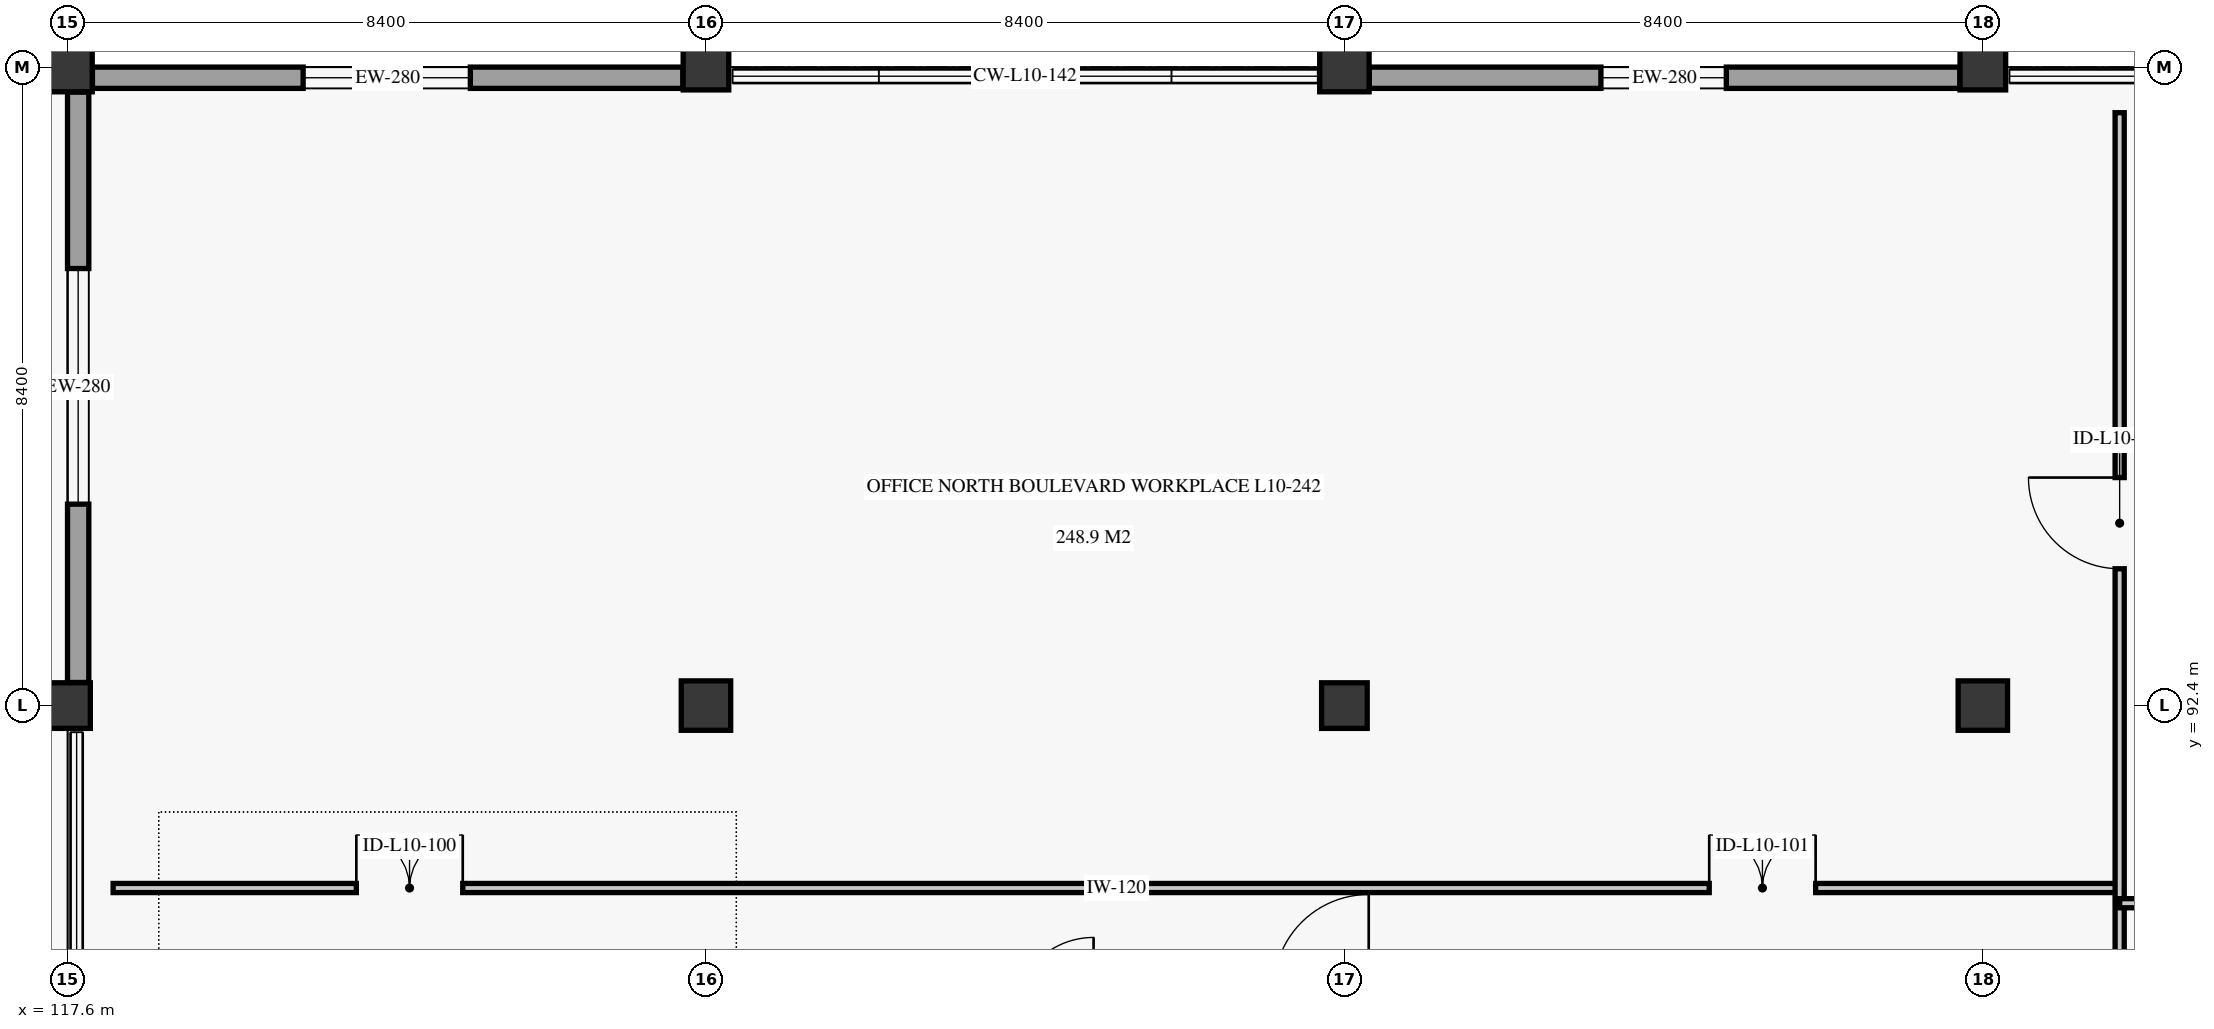
"""IFC4 building model, lengths in metres.
Left out: names, types, materials, properties, quantities, classifications, styles, units other than length and angle.
Written with IfcOpenShell. Run it as: python <this file> out.ifc"""

import sys

from ifc_helpers import new_model, si_unit, direction, frame, frame_2d, origin, origin_2d, place, context, subcontext, project, spatial, rectangle, extrude, element, fill, save


model = new_model("IFC4")
c1 = context("Model", 3, precision=1e-05, world=origin(), true_north=direction((0.0, 1.0)))
c2 = subcontext(c1, "Body", "Model", "MODEL_VIEW")
j1 = project(units=[si_unit("LENGTHUNIT", "METRE"), si_unit("PLANEANGLEUNIT", "RADIAN")], contexts=[c1])
p1 = place(None, origin())
s1 = spatial("IfcSite", under=j1, at=p1, CompositionType="ELEMENT")
p2 = place(p1, origin())
s2 = spatial("IfcBuilding", under=s1, at=p2, CompositionType="ELEMENT")
p3 = place(p2, frame((0.0, 0.0, 42.7)))
s3 = spatial("IfcBuildingStorey", under=s2, at=p3, CompositionType="ELEMENT", Elevation=42.7)
p4 = place(p3, frame((117.6, 92.4, 0.0), z_axis=(0.0, 0.0, 1.0), x_axis=(1.0, 0.0, 0.0)))
e1 = element("IfcColumn", 1, at=p4, inside=s3, PredefinedType="COLUMN", context=c2, shape_type="SweptSolid", body=[
    extrude(rectangle(XDim=0.6, YDim=0.6, at=origin_2d()), origin(), (0.0, 0.0, 1.0), 3.72),
])
for number, where, z_axis, x_axis in (
    (2, (117.6, 100.8, 0.0), (0.0, 0.0, 1.0), (1.0, 0.0, 0.0)),
    (3, (126.0, 92.4, 0.0), (0.0, 0.0, 1.0), (1.0, 0.0, 0.0)),
):
    element("IfcColumn", number, at=place(p3, frame(where, z_axis=z_axis, x_axis=x_axis)), inside=s3, PredefinedType="COLUMN", context=c2, shape_type="SweptSolid", body=[
        extrude(rectangle(XDim=0.65, YDim=0.65, at=origin_2d()), origin(), (0.0, 0.0, 1.0), 3.72),
    ])
for number, where, z_axis, x_axis in (
    (4, (126.0, 100.8, 0.0), (0.0, 0.0, 1.0), (1.0, 0.0, 0.0)),
    (5, (134.4, 92.4, 0.0), (0.0, 0.0, 1.0), (1.0, 0.0, 0.0)),
):
    element("IfcColumn", number, at=place(p3, frame(where, z_axis=z_axis, x_axis=x_axis)), inside=s3, PredefinedType="COLUMN", context=c2, shape_type="SweptSolid", body=[
        extrude(rectangle(XDim=0.6, YDim=0.6, at=origin_2d()), origin(), (0.0, 0.0, 1.0), 3.72),
    ])
for number, where, z_axis, x_axis in (
    (6, (134.4, 100.8, 0.0), (0.0, 0.0, 1.0), (1.0, 0.0, 0.0)),
    (7, (142.8, 92.4, 0.0), (0.0, 0.0, 1.0), (1.0, 0.0, 0.0)),
):
    element("IfcColumn", number, at=place(p3, frame(where, z_axis=z_axis, x_axis=x_axis)), inside=s3, PredefinedType="COLUMN", context=c2, shape_type="SweptSolid", body=[
        extrude(rectangle(XDim=0.65, YDim=0.65, at=origin_2d()), origin(), (0.0, 0.0, 1.0), 3.72),
    ])
p5 = place(p3, frame((142.8, 100.8, 0.0), z_axis=(0.0, 0.0, 1.0), x_axis=(1.0, 0.0, 0.0)))
e8 = element("IfcColumn", 8, at=p5, inside=s3, PredefinedType="COLUMN", context=c2, shape_type="SweptSolid", body=[
    extrude(rectangle(XDim=0.6, YDim=0.6, at=origin_2d()), origin(), (0.0, 0.0, 1.0), 3.72),
])
p6 = place(p3, frame((117.928, 100.66, 0.0), z_axis=(0.0, 0.0, 1.0), x_axis=(1.0, 0.0, 0.0)))
e9 = element("IfcWall", 9, at=p6, inside=s3, PredefinedType="SOLIDWALL", context=c2, shape_type="SweptSolid", body=[
    extrude(rectangle(XDim=7.768, YDim=0.28, at=frame_2d((3.884, 0.0))), origin(), (0.0, 0.0, 1.0), 3.04),
])
p7 = place(p6, frame((2.772, 0.0, 0.85)))
e10 = element("IfcOpeningElement", 10, at=p7, cuts=e9, PredefinedType="OPENING", context=c2, shape_type="SweptSolid", body=[
    extrude(rectangle(XDim=2.2, YDim=1.8, at=frame_2d((1.1, 0.9))), frame((0.0, 0.15, 0.0), z_axis=(0.0, -1.0, 0.0), x_axis=(1.0, 0.0, 0.0)), (0.0, 0.0, 1.0), 0.3),
])
p8 = place(p3, frame((134.728, 100.66, 0.0), z_axis=(0.0, 0.0, 1.0), x_axis=(1.0, 0.0, 0.0)))
e11 = element("IfcWall", 11, at=p8, inside=s3, PredefinedType="SOLIDWALL", context=c2, shape_type="SweptSolid", body=[
    extrude(rectangle(XDim=7.77, YDim=0.28, at=frame_2d((3.885, 0.0))), origin(), (0.0, 0.0, 1.0), 3.04),
])
p9 = place(p8, frame((3.047, 0.0, 0.85)))
e12 = element("IfcOpeningElement", 12, at=p9, cuts=e11, PredefinedType="OPENING", context=c2, shape_type="SweptSolid", body=[
    extrude(rectangle(XDim=1.65, YDim=1.75, at=frame_2d((0.825, 0.875))), frame((0.0, 0.15, 0.0), z_axis=(0.0, -1.0, 0.0), x_axis=(1.0, 0.0, 0.0)), (0.0, 0.0, 1.0), 0.3),
])
p10 = place(p3, frame((117.74, 92.704, 0.0), z_axis=(0.0, 0.0, 1.0), x_axis=(0.0, 1.0, 0.0)))
e13 = element("IfcWall", 13, at=p10, inside=s3, PredefinedType="SOLIDWALL", context=c2, shape_type="SweptSolid", body=[
    extrude(rectangle(XDim=7.768, YDim=0.28, at=frame_2d((3.884, 0.0))), origin(), (0.0, 0.0, 1.0), 3.04),
])
p11 = place(p10, frame((2.346, 0.0, 0.85)))
e14 = element("IfcOpeningElement", 14, at=p11, cuts=e13, PredefinedType="OPENING", context=c2, shape_type="SweptSolid", body=[
    extrude(rectangle(XDim=3.1, YDim=1.85, at=frame_2d((1.55, 0.925))), frame((0.0, 0.15, 0.0), z_axis=(0.0, -1.0, 0.0), x_axis=(1.0, 0.0, 0.0)), (0.0, 0.0, 1.0), 0.3),
])
p12 = place(p3, frame((109.32, 100.68, 0.0), z_axis=(0.0, 0.0, 1.0), x_axis=(1.0, 0.0, 0.0)))
e15 = element("IfcWall", 15, at=p12, inside=s3, PredefinedType="PARAPET", context=c2, shape_type="SweptSolid", body=[
    extrude(rectangle(XDim=8.16, YDim=0.19, at=frame_2d((4.08, 0.0))), origin(), (0.0, 0.0, 1.0), 1.25),
])
p13 = place(p3, frame((118.2, 90.0, 0.0), z_axis=(0.0, 0.0, 1.0), x_axis=(1.0, 0.0, 0.0)))
e16 = element("IfcWall", 16, at=p13, inside=s3, PredefinedType="PARTITIONING", context=c2, shape_type="SweptSolid", body=[
    extrude(rectangle(XDim=26.4, YDim=0.12, at=frame_2d((13.2, 0.0))), origin(), (0.0, 0.0, 1.0), 3.34),
])
p14 = place(p13, frame((3.2, 0.0, 0.0)))
e17 = element("IfcOpeningElement", 17, at=p14, cuts=e16, PredefinedType="OPENING", context=c2, shape_type="SweptSolid", body=[
    extrude(rectangle(XDim=1.4, YDim=2.35, at=frame_2d((0.7, 1.175))), frame((0.0, 0.07, 0.0), z_axis=(0.0, -1.0, 0.0), x_axis=(1.0, 0.0, 0.0)), (0.0, 0.0, 1.0), 0.14),
])
p15 = place(p13, frame((21.0, 0.0, 0.0)))
e18 = element("IfcOpeningElement", 18, at=p15, cuts=e16, PredefinedType="OPENING", context=c2, shape_type="SweptSolid", body=[
    extrude(rectangle(XDim=1.4, YDim=2.35, at=frame_2d((0.7, 1.175))), frame((0.0, 0.07, 0.0), z_axis=(0.0, -1.0, 0.0), x_axis=(1.0, 0.0, 0.0)), (0.0, 0.0, 1.0), 0.14),
])
p16 = place(p3, frame((144.6, 67.8, 0.0), z_axis=(0.0, 0.0, 1.0), x_axis=(0.0, 1.0, 0.0)))
e19 = element("IfcWall", 19, at=p16, inside=s3, PredefinedType="PARTITIONING", context=c2, shape_type="SweptSolid", body=[
    extrude(rectangle(XDim=32.4, YDim=0.12, at=frame_2d((16.2, 0.0))), origin(), (0.0, 0.0, 1.0), 3.34),
])
p17 = place(p16, frame((4.2, 0.0, 0.0)))
e20 = element("IfcOpeningElement", 20, at=p17, cuts=e19, PredefinedType="OPENING", context=c2, shape_type="SweptSolid", body=[
    extrude(rectangle(XDim=1.1, YDim=2.15, at=frame_2d((0.55, 1.075))), frame((0.0, 0.07, 0.0), z_axis=(0.0, -1.0, 0.0), x_axis=(1.0, 0.0, 0.0)), (0.0, 0.0, 1.0), 0.14),
])
p18 = place(p16, frame((26.4, 0.0, 0.0)))
e21 = element("IfcOpeningElement", 21, at=p18, cuts=e19, PredefinedType="OPENING", context=c2, shape_type="SweptSolid", body=[
    extrude(rectangle(XDim=1.2, YDim=2.3, at=frame_2d((0.6, 1.15))), frame((0.0, 0.07, 0.0), z_axis=(0.0, -1.0, 0.0), x_axis=(1.0, 0.0, 0.0)), (0.0, 0.0, 1.0), 0.14),
])
p19 = place(p3, frame((144.6, 89.8, 0.0), z_axis=(0.0, 0.0, 1.0), x_axis=(1.0, 0.0, 0.0)))
e22 = element("IfcWall", 22, at=p19, inside=s3, PredefinedType="PARTITIONING", context=c2, shape_type="SweptSolid", body=[
    extrude(rectangle(XDim=14.4, YDim=0.12, at=frame_2d((7.2, 0.0))), origin(), (0.0, 0.0, 1.0), 3.34),
])
p20 = place(p7, origin())
e23 = element("IfcWindow", 23, at=p20, inside=s3, PartitioningType="SINGLE_PANEL", PredefinedType="WINDOW", context=c2, shape_type="SweptSolid", body=[
    extrude(rectangle(XDim=2.2, YDim=1.8, at=frame_2d((1.1, 0.9))), frame((0.0, 0.03, 0.0), z_axis=(0.0, -1.0, 0.0), x_axis=(1.0, 0.0, 0.0)), (0.0, 0.0, 1.0), 0.06),
])
fill(e10, e23)
p21 = place(p9, origin())
e24 = element("IfcWindow", 24, at=p21, inside=s3, PartitioningType="SINGLE_PANEL", PredefinedType="WINDOW", context=c2, shape_type="SweptSolid", body=[
    extrude(rectangle(XDim=1.65, YDim=1.75, at=frame_2d((0.825, 0.875))), frame((0.0, 0.03, 0.0), z_axis=(0.0, -1.0, 0.0), x_axis=(1.0, 0.0, 0.0)), (0.0, 0.0, 1.0), 0.06),
])
fill(e12, e24)
p22 = place(p11, origin())
e25 = element("IfcWindow", 25, at=p22, inside=s3, PartitioningType="SINGLE_PANEL", PredefinedType="WINDOW", context=c2, shape_type="SweptSolid", body=[
    extrude(rectangle(XDim=3.1, YDim=1.85, at=frame_2d((1.55, 0.925))), frame((0.0, 0.03, 0.0), z_axis=(0.0, -1.0, 0.0), x_axis=(1.0, 0.0, 0.0)), (0.0, 0.0, 1.0), 0.06),
])
fill(e14, e25)
p23 = place(p14, origin())
e26 = element("IfcDoor", 26, at=p23, inside=s3, OperationType="DOUBLE_DOOR_SINGLE_SWING", PredefinedType="DOOR", context=c2, shape_type="SweptSolid", body=[
    extrude(rectangle(XDim=1.4, YDim=2.35, at=frame_2d((0.7, 1.175))), frame((0.0, 0.025, 0.0), z_axis=(0.0, -1.0, 0.0), x_axis=(1.0, 0.0, 0.0)), (0.0, 0.0, 1.0), 0.05),
])
fill(e17, e26)
p24 = place(p15, origin())
e27 = element("IfcDoor", 27, at=p24, inside=s3, OperationType="DOUBLE_DOOR_SINGLE_SWING", PredefinedType="DOOR", context=c2, shape_type="SweptSolid", body=[
    extrude(rectangle(XDim=1.4, YDim=2.35, at=frame_2d((0.7, 1.175))), frame((0.0, 0.025, 0.0), z_axis=(0.0, -1.0, 0.0), x_axis=(1.0, 0.0, 0.0)), (0.0, 0.0, 1.0), 0.05),
])
fill(e18, e27)
p25 = place(p18, origin())
e28 = element("IfcDoor", 28, at=p25, inside=s3, OperationType="SINGLE_SWING_RIGHT", PredefinedType="DOOR", context=c2, shape_type="SweptSolid", body=[
    extrude(rectangle(XDim=1.2, YDim=2.3, at=frame_2d((0.6, 1.15))), frame((0.0, 0.025, 0.0), z_axis=(0.0, -1.0, 0.0), x_axis=(1.0, 0.0, 0.0)), (0.0, 0.0, 1.0), 0.05),
])
fill(e21, e28)
save(model, sys.argv[1])
